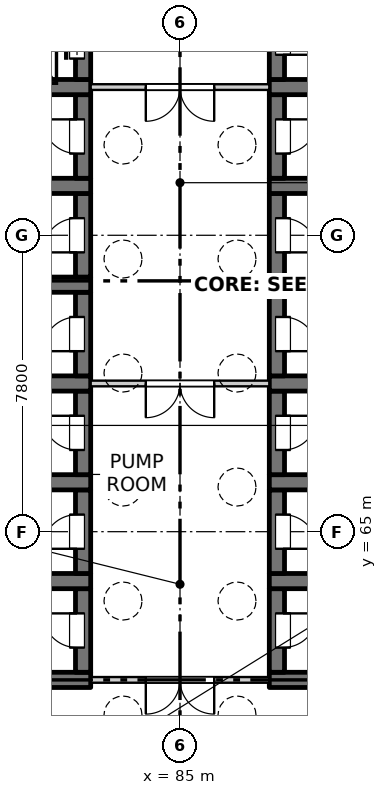
"""IFC4 building model, lengths in metres.
Left out: names, types, materials, properties, quantities, classifications, styles, units other than length and angle.
Written with IfcOpenShell. Run it as: python <this file> out.ifc"""

import sys

from ifc_helpers import new_model, si_unit, direction, frame, frame_2d, origin, place, context, subcontext, project, spatial, rectangle, extrude, element, fill, save


model = new_model("IFC4")
c1 = context("Model", 3, precision=1e-05, world=origin(), true_north=direction((0.0, 1.0)))
c2 = subcontext(c1, "Body", "Model", "MODEL_VIEW")
j1 = project(units=[si_unit("LENGTHUNIT", "METRE"), si_unit("PLANEANGLEUNIT", "RADIAN")], contexts=[c1])
p1 = place(None, origin())
s1 = spatial("IfcSite", under=j1, at=p1, CompositionType="ELEMENT")
p2 = place(p1, origin())
s2 = spatial("IfcBuilding", under=s1, at=p2, CompositionType="ELEMENT")
p3 = place(p2, frame((0.0, 0.0, -9.0)))
s3 = spatial("IfcBuildingStorey", under=s2, at=p3, CompositionType="ELEMENT", Elevation=-9.0)
p4 = place(p3, frame((79.65, 61.1, -0.5), z_axis=(0.0, 0.0, 1.0), x_axis=(1.0, 0.0, 0.0)))
e1 = element("IfcWall", 1, at=p4, inside=s3, PredefinedType="SOLIDWALL", context=c2, shape_type="SweptSolid", body=[
    extrude(rectangle(XDim=3.0, YDim=0.4, at=frame_2d((1.5, 0.0))), origin(), (0.0, 0.0, 1.0), 4.65),
])
p5 = place(p3, frame((82.45, 61.3, -0.5), z_axis=(0.0, 0.0, 1.0), x_axis=(0.0, 1.0, 0.0)))
e2 = element("IfcWall", 2, at=p5, inside=s3, PredefinedType="SOLIDWALL", context=c2, shape_type="SweptSolid", body=[
    extrude(rectangle(XDim=2.2, YDim=0.4, at=frame_2d((1.1, 0.0))), origin(), (0.0, 0.0, 1.0), 4.65),
])
p6 = place(p5, frame((0.65, 0.0, 0.5)))
e3 = element("IfcOpeningElement", 3, at=p6, cuts=e2, PredefinedType="OPENING", context=c2, shape_type="SweptSolid", body=[
    extrude(rectangle(XDim=0.9, YDim=2.1, at=frame_2d((0.45, 1.05))), frame((0.0, 0.21, 0.0), z_axis=(0.0, -1.0, 0.0), x_axis=(1.0, 0.0, 0.0)), (0.0, 0.0, 1.0), 0.42),
])
p7 = place(p3, frame((79.65, 63.7, -0.5), z_axis=(0.0, 0.0, 1.0), x_axis=(1.0, 0.0, 0.0)))
e4 = element("IfcWall", 4, at=p7, inside=s3, PredefinedType="SOLIDWALL", context=c2, shape_type="SweptSolid", body=[
    extrude(rectangle(XDim=3.0, YDim=0.4, at=frame_2d((1.5, 0.0))), origin(), (0.0, 0.0, 1.0), 4.65),
])
p8 = place(p3, frame((82.45, 63.9, -0.5), z_axis=(0.0, 0.0, 1.0), x_axis=(0.0, 1.0, 0.0)))
e5 = element("IfcWall", 5, at=p8, inside=s3, PredefinedType="SOLIDWALL", context=c2, shape_type="SweptSolid", body=[
    extrude(rectangle(XDim=2.2, YDim=0.4, at=frame_2d((1.1, 0.0))), origin(), (0.0, 0.0, 1.0), 4.65),
])
p9 = place(p8, frame((0.65, 0.0, 0.5)))
e6 = element("IfcOpeningElement", 6, at=p9, cuts=e5, PredefinedType="OPENING", context=c2, shape_type="SweptSolid", body=[
    extrude(rectangle(XDim=0.9, YDim=2.1, at=frame_2d((0.45, 1.05))), frame((0.0, 0.21, 0.0), z_axis=(0.0, -1.0, 0.0), x_axis=(1.0, 0.0, 0.0)), (0.0, 0.0, 1.0), 0.42),
])
p10 = place(p3, frame((79.65, 66.3, -0.5), z_axis=(0.0, 0.0, 1.0), x_axis=(1.0, 0.0, 0.0)))
e7 = element("IfcWall", 7, at=p10, inside=s3, PredefinedType="SOLIDWALL", context=c2, shape_type="SweptSolid", body=[
    extrude(rectangle(XDim=3.0, YDim=0.4, at=frame_2d((1.5, 0.0))), origin(), (0.0, 0.0, 1.0), 4.65),
])
p11 = place(p3, frame((82.45, 66.5, -0.5), z_axis=(0.0, 0.0, 1.0), x_axis=(0.0, 1.0, 0.0)))
e8 = element("IfcWall", 8, at=p11, inside=s3, PredefinedType="SOLIDWALL", context=c2, shape_type="SweptSolid", body=[
    extrude(rectangle(XDim=2.2, YDim=0.4, at=frame_2d((1.1, 0.0))), origin(), (0.0, 0.0, 1.0), 4.65),
])
p12 = place(p11, frame((0.65, 0.0, 0.5)))
e9 = element("IfcOpeningElement", 9, at=p12, cuts=e8, PredefinedType="OPENING", context=c2, shape_type="SweptSolid", body=[
    extrude(rectangle(XDim=0.9, YDim=2.1, at=frame_2d((0.45, 1.05))), frame((0.0, 0.21, 0.0), z_axis=(0.0, -1.0, 0.0), x_axis=(1.0, 0.0, 0.0)), (0.0, 0.0, 1.0), 0.42),
])
p13 = place(p3, frame((79.65, 68.9, -0.5), z_axis=(0.0, 0.0, 1.0), x_axis=(1.0, 0.0, 0.0)))
e10 = element("IfcWall", 10, at=p13, inside=s3, PredefinedType="SOLIDWALL", context=c2, shape_type="SweptSolid", body=[
    extrude(rectangle(XDim=3.0, YDim=0.4, at=frame_2d((1.5, 0.0))), origin(), (0.0, 0.0, 1.0), 4.65),
])
p14 = place(p3, frame((82.45, 69.1, -0.5), z_axis=(0.0, 0.0, 1.0), x_axis=(0.0, 1.0, 0.0)))
e11 = element("IfcWall", 11, at=p14, inside=s3, PredefinedType="SOLIDWALL", context=c2, shape_type="SweptSolid", body=[
    extrude(rectangle(XDim=2.2, YDim=0.4, at=frame_2d((1.1, 0.0))), origin(), (0.0, 0.0, 1.0), 4.65),
])
p15 = place(p14, frame((0.65, 0.0, 0.5)))
e12 = element("IfcOpeningElement", 12, at=p15, cuts=e11, PredefinedType="OPENING", context=c2, shape_type="SweptSolid", body=[
    extrude(rectangle(XDim=0.9, YDim=2.1, at=frame_2d((0.45, 1.05))), frame((0.0, 0.21, 0.0), z_axis=(0.0, -1.0, 0.0), x_axis=(1.0, 0.0, 0.0)), (0.0, 0.0, 1.0), 0.42),
])
p16 = place(p3, frame((79.65, 71.5, -0.5), z_axis=(0.0, 0.0, 1.0), x_axis=(1.0, 0.0, 0.0)))
e13 = element("IfcWall", 13, at=p16, inside=s3, PredefinedType="SOLIDWALL", context=c2, shape_type="SweptSolid", body=[
    extrude(rectangle(XDim=3.0, YDim=0.4, at=frame_2d((1.5, 0.0))), origin(), (0.0, 0.0, 1.0), 4.65),
])
p17 = place(p3, frame((82.45, 71.7, -0.5), z_axis=(0.0, 0.0, 1.0), x_axis=(0.0, 1.0, 0.0)))
e14 = element("IfcWall", 14, at=p17, inside=s3, PredefinedType="SOLIDWALL", context=c2, shape_type="SweptSolid", body=[
    extrude(rectangle(XDim=2.2, YDim=0.4, at=frame_2d((1.1, 0.0))), origin(), (0.0, 0.0, 1.0), 4.65),
])
p18 = place(p17, frame((0.65, 0.0, 0.5)))
e15 = element("IfcOpeningElement", 15, at=p18, cuts=e14, PredefinedType="OPENING", context=c2, shape_type="SweptSolid", body=[
    extrude(rectangle(XDim=0.9, YDim=2.1, at=frame_2d((0.45, 1.05))), frame((0.0, 0.21, 0.0), z_axis=(0.0, -1.0, 0.0), x_axis=(1.0, 0.0, 0.0)), (0.0, 0.0, 1.0), 0.42),
])
p19 = place(p3, frame((79.65, 74.1, -0.5), z_axis=(0.0, 0.0, 1.0), x_axis=(1.0, 0.0, 0.0)))
e16 = element("IfcWall", 16, at=p19, inside=s3, PredefinedType="SOLIDWALL", context=c2, shape_type="SweptSolid", body=[
    extrude(rectangle(XDim=3.0, YDim=0.4, at=frame_2d((1.5, 0.0))), origin(), (0.0, 0.0, 1.0), 4.65),
])
p20 = place(p3, frame((82.45, 74.3, -0.5), z_axis=(0.0, 0.0, 1.0), x_axis=(0.0, 1.0, 0.0)))
e17 = element("IfcWall", 17, at=p20, inside=s3, PredefinedType="SOLIDWALL", context=c2, shape_type="SweptSolid", body=[
    extrude(rectangle(XDim=2.2, YDim=0.4, at=frame_2d((1.1, 0.0))), origin(), (0.0, 0.0, 1.0), 4.65),
])
p21 = place(p20, frame((0.65, 0.0, 0.5)))
e18 = element("IfcOpeningElement", 18, at=p21, cuts=e17, PredefinedType="OPENING", context=c2, shape_type="SweptSolid", body=[
    extrude(rectangle(XDim=0.9, YDim=2.1, at=frame_2d((0.45, 1.05))), frame((0.0, 0.21, 0.0), z_axis=(0.0, -1.0, 0.0), x_axis=(1.0, 0.0, 0.0)), (0.0, 0.0, 1.0), 0.42),
])
p22 = place(p3, frame((79.65, 76.7, -0.5), z_axis=(0.0, 0.0, 1.0), x_axis=(1.0, 0.0, 0.0)))
e19 = element("IfcWall", 19, at=p22, inside=s3, PredefinedType="SOLIDWALL", context=c2, shape_type="SweptSolid", body=[
    extrude(rectangle(XDim=3.0, YDim=0.4, at=frame_2d((1.5, 0.0))), origin(), (0.0, 0.0, 1.0), 4.65),
])
p23 = place(p3, frame((82.45, 76.9, -0.5), z_axis=(0.0, 0.0, 1.0), x_axis=(0.0, 1.0, 0.0)))
e20 = element("IfcWall", 20, at=p23, inside=s3, PredefinedType="SOLIDWALL", context=c2, shape_type="SweptSolid", body=[
    extrude(rectangle(XDim=2.2, YDim=0.4, at=frame_2d((1.1, 0.0))), origin(), (0.0, 0.0, 1.0), 4.65),
])
p24 = place(p23, frame((0.55, 0.0, 0.5)))
e21 = element("IfcOpeningElement", 21, at=p24, cuts=e20, PredefinedType="OPENING", context=c2, shape_type="SweptSolid", body=[
    extrude(rectangle(XDim=1.1, YDim=2.1, at=frame_2d((0.55, 1.05))), frame((0.0, 0.21, 0.0), z_axis=(0.0, -1.0, 0.0), x_axis=(1.0, 0.0, 0.0)), (0.0, 0.0, 1.0), 0.42),
])
p25 = place(p3, frame((87.35, 61.1, -0.5), z_axis=(0.0, 0.0, 1.0), x_axis=(1.0, 0.0, 0.0)))
e22 = element("IfcWall", 22, at=p25, inside=s3, PredefinedType="SOLIDWALL", context=c2, shape_type="SweptSolid", body=[
    extrude(rectangle(XDim=3.0, YDim=0.4, at=frame_2d((1.5, 0.0))), origin(), (0.0, 0.0, 1.0), 4.65),
])
p26 = place(p3, frame((87.55, 61.3, -0.5), z_axis=(0.0, 0.0, 1.0), x_axis=(0.0, 1.0, 0.0)))
e23 = element("IfcWall", 23, at=p26, inside=s3, PredefinedType="SOLIDWALL", context=c2, shape_type="SweptSolid", body=[
    extrude(rectangle(XDim=2.2, YDim=0.4, at=frame_2d((1.1, 0.0))), origin(), (0.0, 0.0, 1.0), 4.65),
])
p27 = place(p26, frame((0.65, 0.0, 0.5)))
e24 = element("IfcOpeningElement", 24, at=p27, cuts=e23, PredefinedType="OPENING", context=c2, shape_type="SweptSolid", body=[
    extrude(rectangle(XDim=0.9, YDim=2.1, at=frame_2d((0.45, 1.05))), frame((0.0, 0.21, 0.0), z_axis=(0.0, -1.0, 0.0), x_axis=(1.0, 0.0, 0.0)), (0.0, 0.0, 1.0), 0.42),
])
p28 = place(p3, frame((87.35, 63.7, -0.5), z_axis=(0.0, 0.0, 1.0), x_axis=(1.0, 0.0, 0.0)))
e25 = element("IfcWall", 25, at=p28, inside=s3, PredefinedType="SOLIDWALL", context=c2, shape_type="SweptSolid", body=[
    extrude(rectangle(XDim=3.0, YDim=0.4, at=frame_2d((1.5, 0.0))), origin(), (0.0, 0.0, 1.0), 4.65),
])
p29 = place(p3, frame((87.55, 63.9, -0.5), z_axis=(0.0, 0.0, 1.0), x_axis=(0.0, 1.0, 0.0)))
e26 = element("IfcWall", 26, at=p29, inside=s3, PredefinedType="SOLIDWALL", context=c2, shape_type="SweptSolid", body=[
    extrude(rectangle(XDim=2.2, YDim=0.4, at=frame_2d((1.1, 0.0))), origin(), (0.0, 0.0, 1.0), 4.65),
])
p30 = place(p29, frame((0.65, 0.0, 0.5)))
e27 = element("IfcOpeningElement", 27, at=p30, cuts=e26, PredefinedType="OPENING", context=c2, shape_type="SweptSolid", body=[
    extrude(rectangle(XDim=0.9, YDim=2.1, at=frame_2d((0.45, 1.05))), frame((0.0, 0.21, 0.0), z_axis=(0.0, -1.0, 0.0), x_axis=(1.0, 0.0, 0.0)), (0.0, 0.0, 1.0), 0.42),
])
p31 = place(p3, frame((87.35, 66.3, -0.5), z_axis=(0.0, 0.0, 1.0), x_axis=(1.0, 0.0, 0.0)))
e28 = element("IfcWall", 28, at=p31, inside=s3, PredefinedType="SOLIDWALL", context=c2, shape_type="SweptSolid", body=[
    extrude(rectangle(XDim=3.0, YDim=0.4, at=frame_2d((1.5, 0.0))), origin(), (0.0, 0.0, 1.0), 4.65),
])
p32 = place(p3, frame((87.55, 66.5, -0.5), z_axis=(0.0, 0.0, 1.0), x_axis=(0.0, 1.0, 0.0)))
e29 = element("IfcWall", 29, at=p32, inside=s3, PredefinedType="SOLIDWALL", context=c2, shape_type="SweptSolid", body=[
    extrude(rectangle(XDim=2.2, YDim=0.4, at=frame_2d((1.1, 0.0))), origin(), (0.0, 0.0, 1.0), 4.65),
])
p33 = place(p32, frame((0.65, 0.0, 0.5)))
e30 = element("IfcOpeningElement", 30, at=p33, cuts=e29, PredefinedType="OPENING", context=c2, shape_type="SweptSolid", body=[
    extrude(rectangle(XDim=0.9, YDim=2.1, at=frame_2d((0.45, 1.05))), frame((0.0, 0.21, 0.0), z_axis=(0.0, -1.0, 0.0), x_axis=(1.0, 0.0, 0.0)), (0.0, 0.0, 1.0), 0.42),
])
p34 = place(p3, frame((87.35, 68.9, -0.5), z_axis=(0.0, 0.0, 1.0), x_axis=(1.0, 0.0, 0.0)))
e31 = element("IfcWall", 31, at=p34, inside=s3, PredefinedType="SOLIDWALL", context=c2, shape_type="SweptSolid", body=[
    extrude(rectangle(XDim=3.0, YDim=0.4, at=frame_2d((1.5, 0.0))), origin(), (0.0, 0.0, 1.0), 4.65),
])
p35 = place(p3, frame((87.55, 69.1, -0.5), z_axis=(0.0, 0.0, 1.0), x_axis=(0.0, 1.0, 0.0)))
e32 = element("IfcWall", 32, at=p35, inside=s3, PredefinedType="SOLIDWALL", context=c2, shape_type="SweptSolid", body=[
    extrude(rectangle(XDim=2.2, YDim=0.4, at=frame_2d((1.1, 0.0))), origin(), (0.0, 0.0, 1.0), 4.65),
])
p36 = place(p35, frame((0.65, 0.0, 0.5)))
e33 = element("IfcOpeningElement", 33, at=p36, cuts=e32, PredefinedType="OPENING", context=c2, shape_type="SweptSolid", body=[
    extrude(rectangle(XDim=0.9, YDim=2.1, at=frame_2d((0.45, 1.05))), frame((0.0, 0.21, 0.0), z_axis=(0.0, -1.0, 0.0), x_axis=(1.0, 0.0, 0.0)), (0.0, 0.0, 1.0), 0.42),
])
p37 = place(p3, frame((87.35, 71.5, -0.5), z_axis=(0.0, 0.0, 1.0), x_axis=(1.0, 0.0, 0.0)))
e34 = element("IfcWall", 34, at=p37, inside=s3, PredefinedType="SOLIDWALL", context=c2, shape_type="SweptSolid", body=[
    extrude(rectangle(XDim=3.0, YDim=0.4, at=frame_2d((1.5, 0.0))), origin(), (0.0, 0.0, 1.0), 4.65),
])
p38 = place(p3, frame((87.55, 71.7, -0.5), z_axis=(0.0, 0.0, 1.0), x_axis=(0.0, 1.0, 0.0)))
e35 = element("IfcWall", 35, at=p38, inside=s3, PredefinedType="SOLIDWALL", context=c2, shape_type="SweptSolid", body=[
    extrude(rectangle(XDim=2.2, YDim=0.4, at=frame_2d((1.1, 0.0))), origin(), (0.0, 0.0, 1.0), 4.65),
])
p39 = place(p38, frame((0.65, 0.0, 0.5)))
e36 = element("IfcOpeningElement", 36, at=p39, cuts=e35, PredefinedType="OPENING", context=c2, shape_type="SweptSolid", body=[
    extrude(rectangle(XDim=0.9, YDim=2.1, at=frame_2d((0.45, 1.05))), frame((0.0, 0.21, 0.0), z_axis=(0.0, -1.0, 0.0), x_axis=(1.0, 0.0, 0.0)), (0.0, 0.0, 1.0), 0.42),
])
p40 = place(p3, frame((87.35, 74.1, -0.5), z_axis=(0.0, 0.0, 1.0), x_axis=(1.0, 0.0, 0.0)))
e37 = element("IfcWall", 37, at=p40, inside=s3, PredefinedType="SOLIDWALL", context=c2, shape_type="SweptSolid", body=[
    extrude(rectangle(XDim=3.0, YDim=0.4, at=frame_2d((1.5, 0.0))), origin(), (0.0, 0.0, 1.0), 4.65),
])
p41 = place(p3, frame((87.55, 74.3, -0.5), z_axis=(0.0, 0.0, 1.0), x_axis=(0.0, 1.0, 0.0)))
e38 = element("IfcWall", 38, at=p41, inside=s3, PredefinedType="SOLIDWALL", context=c2, shape_type="SweptSolid", body=[
    extrude(rectangle(XDim=2.2, YDim=0.4, at=frame_2d((1.1, 0.0))), origin(), (0.0, 0.0, 1.0), 4.65),
])
p42 = place(p41, frame((0.65, 0.0, 0.5)))
e39 = element("IfcOpeningElement", 39, at=p42, cuts=e38, PredefinedType="OPENING", context=c2, shape_type="SweptSolid", body=[
    extrude(rectangle(XDim=0.9, YDim=2.1, at=frame_2d((0.45, 1.05))), frame((0.0, 0.21, 0.0), z_axis=(0.0, -1.0, 0.0), x_axis=(1.0, 0.0, 0.0)), (0.0, 0.0, 1.0), 0.42),
])
p43 = place(p3, frame((87.35, 76.7, -0.5), z_axis=(0.0, 0.0, 1.0), x_axis=(1.0, 0.0, 0.0)))
e40 = element("IfcWall", 40, at=p43, inside=s3, PredefinedType="SOLIDWALL", context=c2, shape_type="SweptSolid", body=[
    extrude(rectangle(XDim=3.0, YDim=0.4, at=frame_2d((1.5, 0.0))), origin(), (0.0, 0.0, 1.0), 4.65),
])
p44 = place(p3, frame((87.55, 76.9, -0.5), z_axis=(0.0, 0.0, 1.0), x_axis=(0.0, 1.0, 0.0)))
e41 = element("IfcWall", 41, at=p44, inside=s3, PredefinedType="SOLIDWALL", context=c2, shape_type="SweptSolid", body=[
    extrude(rectangle(XDim=2.2, YDim=0.4, at=frame_2d((1.1, 0.0))), origin(), (0.0, 0.0, 1.0), 4.65),
])
p45 = place(p44, frame((0.65, 0.0, 0.5)))
e42 = element("IfcOpeningElement", 42, at=p45, cuts=e41, PredefinedType="OPENING", context=c2, shape_type="SweptSolid", body=[
    extrude(rectangle(XDim=0.9, YDim=2.1, at=frame_2d((0.45, 1.05))), frame((0.0, 0.21, 0.0), z_axis=(0.0, -1.0, 0.0), x_axis=(1.0, 0.0, 0.0)), (0.0, 0.0, 1.0), 0.42),
])
p46 = place(p3, frame((82.65, 61.1, 0.0), z_axis=(0.0, 0.0, 1.0), x_axis=(1.0, 0.0, 0.0)))
e43 = element("IfcWall", 43, at=p46, inside=s3, PredefinedType="PARTITIONING", context=c2, shape_type="SweptSolid", body=[
    extrude(rectangle(XDim=4.7, YDim=0.15, at=frame_2d((2.35, 0.0))), origin(), (0.0, 0.0, 1.0), 4.15),
])
p47 = place(p46, frame((1.45, 0.0, 0.0)))
e44 = element("IfcOpeningElement", 44, at=p47, cuts=e43, PredefinedType="OPENING", context=c2, shape_type="SweptSolid", body=[
    extrude(rectangle(XDim=1.8, YDim=2.1, at=frame_2d((0.9, 1.05))), frame((0.0, 0.085, 0.0), z_axis=(0.0, -1.0, 0.0), x_axis=(1.0, 0.0, 0.0)), (0.0, 0.0, 1.0), 0.17),
])
p48 = place(p3, frame((82.65, 68.9, 0.0), z_axis=(0.0, 0.0, 1.0), x_axis=(1.0, 0.0, 0.0)))
e45 = element("IfcWall", 45, at=p48, inside=s3, PredefinedType="PARTITIONING", context=c2, shape_type="SweptSolid", body=[
    extrude(rectangle(XDim=4.7, YDim=0.15, at=frame_2d((2.35, 0.0))), origin(), (0.0, 0.0, 1.0), 4.15),
])
p49 = place(p48, frame((1.45, 0.0, 0.0)))
e46 = element("IfcOpeningElement", 46, at=p49, cuts=e45, PredefinedType="OPENING", context=c2, shape_type="SweptSolid", body=[
    extrude(rectangle(XDim=1.8, YDim=2.1, at=frame_2d((0.9, 1.05))), frame((0.0, 0.085, 0.0), z_axis=(0.0, -1.0, 0.0), x_axis=(1.0, 0.0, 0.0)), (0.0, 0.0, 1.0), 0.17),
])
p50 = place(p3, frame((82.65, 76.7, 0.0), z_axis=(0.0, 0.0, 1.0), x_axis=(1.0, 0.0, 0.0)))
e47 = element("IfcWall", 47, at=p50, inside=s3, PredefinedType="PARTITIONING", context=c2, shape_type="SweptSolid", body=[
    extrude(rectangle(XDim=4.7, YDim=0.15, at=frame_2d((2.35, 0.0))), origin(), (0.0, 0.0, 1.0), 4.15),
])
p51 = place(p50, frame((1.45, 0.0, 0.0)))
e48 = element("IfcOpeningElement", 48, at=p51, cuts=e47, PredefinedType="OPENING", context=c2, shape_type="SweptSolid", body=[
    extrude(rectangle(XDim=1.8, YDim=2.1, at=frame_2d((0.9, 1.05))), frame((0.0, 0.085, 0.0), z_axis=(0.0, -1.0, 0.0), x_axis=(1.0, 0.0, 0.0)), (0.0, 0.0, 1.0), 0.17),
])
p52 = place(p47, origin())
e49 = element("IfcDoor", 49, at=p52, inside=s3, OperationType="DOUBLE_DOOR_SINGLE_SWING", PredefinedType="DOOR", context=c2, shape_type="SweptSolid", body=[
    extrude(rectangle(XDim=1.8, YDim=2.1, at=frame_2d((0.9, 1.05))), frame((0.0, 0.025, 0.0), z_axis=(0.0, -1.0, 0.0), x_axis=(1.0, 0.0, 0.0)), (0.0, 0.0, 1.0), 0.05),
])
fill(e44, e49)
p53 = place(p6, origin())
e50 = element("IfcDoor", 50, at=p53, inside=s3, OperationType="SINGLE_SWING_RIGHT", PredefinedType="DOOR", context=c2, shape_type="SweptSolid", body=[
    extrude(rectangle(XDim=0.9, YDim=2.1, at=frame_2d((0.45, 1.05))), frame((0.0, 0.185, 0.0), z_axis=(0.0, -1.0, 0.0), x_axis=(1.0, 0.0, 0.0)), (0.0, 0.0, 1.0), 0.05),
])
fill(e3, e50)
p54 = place(p27, origin())
e51 = element("IfcDoor", 51, at=p54, inside=s3, OperationType="SINGLE_SWING_LEFT", PredefinedType="DOOR", context=c2, shape_type="SweptSolid", body=[
    extrude(rectangle(XDim=0.9, YDim=2.1, at=frame_2d((0.45, 1.05))), frame((0.0, -0.135, 0.0), z_axis=(0.0, -1.0, 0.0), x_axis=(1.0, 0.0, 0.0)), (0.0, 0.0, 1.0), 0.05),
])
fill(e24, e51)
p55 = place(p9, origin())
e52 = element("IfcDoor", 52, at=p55, inside=s3, OperationType="SINGLE_SWING_LEFT", PredefinedType="DOOR", context=c2, shape_type="SweptSolid", body=[
    extrude(rectangle(XDim=0.9, YDim=2.1, at=frame_2d((0.45, 1.05))), frame((0.0, 0.185, 0.0), z_axis=(0.0, -1.0, 0.0), x_axis=(1.0, 0.0, 0.0)), (0.0, 0.0, 1.0), 0.05),
])
fill(e6, e52)
p56 = place(p30, origin())
e53 = element("IfcDoor", 53, at=p56, inside=s3, OperationType="SINGLE_SWING_RIGHT", PredefinedType="DOOR", context=c2, shape_type="SweptSolid", body=[
    extrude(rectangle(XDim=0.9, YDim=2.1, at=frame_2d((0.45, 1.05))), frame((0.0, -0.135, 0.0), z_axis=(0.0, -1.0, 0.0), x_axis=(1.0, 0.0, 0.0)), (0.0, 0.0, 1.0), 0.05),
])
fill(e27, e53)
p57 = place(p12, origin())
e54 = element("IfcDoor", 54, at=p57, inside=s3, OperationType="SINGLE_SWING_RIGHT", PredefinedType="DOOR", context=c2, shape_type="SweptSolid", body=[
    extrude(rectangle(XDim=0.9, YDim=2.1, at=frame_2d((0.45, 1.05))), frame((0.0, 0.185, 0.0), z_axis=(0.0, -1.0, 0.0), x_axis=(1.0, 0.0, 0.0)), (0.0, 0.0, 1.0), 0.05),
])
fill(e9, e54)
p58 = place(p33, origin())
e55 = element("IfcDoor", 55, at=p58, inside=s3, OperationType="SINGLE_SWING_LEFT", PredefinedType="DOOR", context=c2, shape_type="SweptSolid", body=[
    extrude(rectangle(XDim=0.9, YDim=2.1, at=frame_2d((0.45, 1.05))), frame((0.0, -0.135, 0.0), z_axis=(0.0, -1.0, 0.0), x_axis=(1.0, 0.0, 0.0)), (0.0, 0.0, 1.0), 0.05),
])
fill(e30, e55)
p59 = place(p49, origin())
e56 = element("IfcDoor", 56, at=p59, inside=s3, OperationType="DOUBLE_DOOR_SINGLE_SWING", PredefinedType="DOOR", context=c2, shape_type="SweptSolid", body=[
    extrude(rectangle(XDim=1.8, YDim=2.1, at=frame_2d((0.9, 1.05))), frame((0.0, 0.025, 0.0), z_axis=(0.0, -1.0, 0.0), x_axis=(1.0, 0.0, 0.0)), (0.0, 0.0, 1.0), 0.05),
])
fill(e46, e56)
p60 = place(p15, origin())
e57 = element("IfcDoor", 57, at=p60, inside=s3, OperationType="SINGLE_SWING_LEFT", PredefinedType="DOOR", context=c2, shape_type="SweptSolid", body=[
    extrude(rectangle(XDim=0.9, YDim=2.1, at=frame_2d((0.45, 1.05))), frame((0.0, 0.185, 0.0), z_axis=(0.0, -1.0, 0.0), x_axis=(1.0, 0.0, 0.0)), (0.0, 0.0, 1.0), 0.05),
])
fill(e12, e57)
p61 = place(p36, origin())
e58 = element("IfcDoor", 58, at=p61, inside=s3, OperationType="SINGLE_SWING_RIGHT", PredefinedType="DOOR", context=c2, shape_type="SweptSolid", body=[
    extrude(rectangle(XDim=0.9, YDim=2.1, at=frame_2d((0.45, 1.05))), frame((0.0, -0.135, 0.0), z_axis=(0.0, -1.0, 0.0), x_axis=(1.0, 0.0, 0.0)), (0.0, 0.0, 1.0), 0.05),
])
fill(e33, e58)
p62 = place(p18, origin())
e59 = element("IfcDoor", 59, at=p62, inside=s3, OperationType="SINGLE_SWING_LEFT", PredefinedType="DOOR", context=c2, shape_type="SweptSolid", body=[
    extrude(rectangle(XDim=0.9, YDim=2.1, at=frame_2d((0.45, 1.05))), frame((0.0, 0.185, 0.0), z_axis=(0.0, -1.0, 0.0), x_axis=(1.0, 0.0, 0.0)), (0.0, 0.0, 1.0), 0.05),
])
fill(e15, e59)
p63 = place(p39, origin())
e60 = element("IfcDoor", 60, at=p63, inside=s3, OperationType="SINGLE_SWING_RIGHT", PredefinedType="DOOR", context=c2, shape_type="SweptSolid", body=[
    extrude(rectangle(XDim=0.9, YDim=2.1, at=frame_2d((0.45, 1.05))), frame((0.0, -0.135, 0.0), z_axis=(0.0, -1.0, 0.0), x_axis=(1.0, 0.0, 0.0)), (0.0, 0.0, 1.0), 0.05),
])
fill(e36, e60)
p64 = place(p21, origin())
e61 = element("IfcDoor", 61, at=p64, inside=s3, OperationType="SINGLE_SWING_RIGHT", PredefinedType="DOOR", context=c2, shape_type="SweptSolid", body=[
    extrude(rectangle(XDim=0.9, YDim=2.1, at=frame_2d((0.45, 1.05))), frame((0.0, 0.185, 0.0), z_axis=(0.0, -1.0, 0.0), x_axis=(1.0, 0.0, 0.0)), (0.0, 0.0, 1.0), 0.05),
])
fill(e18, e61)
p65 = place(p42, origin())
e62 = element("IfcDoor", 62, at=p65, inside=s3, OperationType="SINGLE_SWING_LEFT", PredefinedType="DOOR", context=c2, shape_type="SweptSolid", body=[
    extrude(rectangle(XDim=0.9, YDim=2.1, at=frame_2d((0.45, 1.05))), frame((0.0, -0.135, 0.0), z_axis=(0.0, -1.0, 0.0), x_axis=(1.0, 0.0, 0.0)), (0.0, 0.0, 1.0), 0.05),
])
fill(e39, e62)
p66 = place(p51, origin())
e63 = element("IfcDoor", 63, at=p66, inside=s3, OperationType="DOUBLE_DOOR_SINGLE_SWING", PredefinedType="DOOR", context=c2, shape_type="SweptSolid", body=[
    extrude(rectangle(XDim=1.8, YDim=2.1, at=frame_2d((0.9, 1.05))), frame((0.0, 0.025, 0.0), z_axis=(0.0, -1.0, 0.0), x_axis=(1.0, 0.0, 0.0)), (0.0, 0.0, 1.0), 0.05),
])
fill(e48, e63)
p67 = place(p24, origin())
e64 = element("IfcDoor", 64, at=p67, inside=s3, OperationType="SLIDING_TO_LEFT", PredefinedType="DOOR", context=c2, shape_type="SweptSolid", body=[
    extrude(rectangle(XDim=1.1, YDim=2.1, at=frame_2d((0.55, 1.05))), frame((0.0, 0.185, 0.0), z_axis=(0.0, -1.0, 0.0), x_axis=(1.0, 0.0, 0.0)), (0.0, 0.0, 1.0), 0.05),
])
fill(e21, e64)
p68 = place(p45, origin())
e65 = element("IfcDoor", 65, at=p68, inside=s3, OperationType="SINGLE_SWING_RIGHT", PredefinedType="DOOR", context=c2, shape_type="SweptSolid", body=[
    extrude(rectangle(XDim=0.9, YDim=2.1, at=frame_2d((0.45, 1.05))), frame((0.0, -0.135, 0.0), z_axis=(0.0, -1.0, 0.0), x_axis=(1.0, 0.0, 0.0)), (0.0, 0.0, 1.0), 0.05),
])
fill(e42, e65)
save(model, sys.argv[1])
